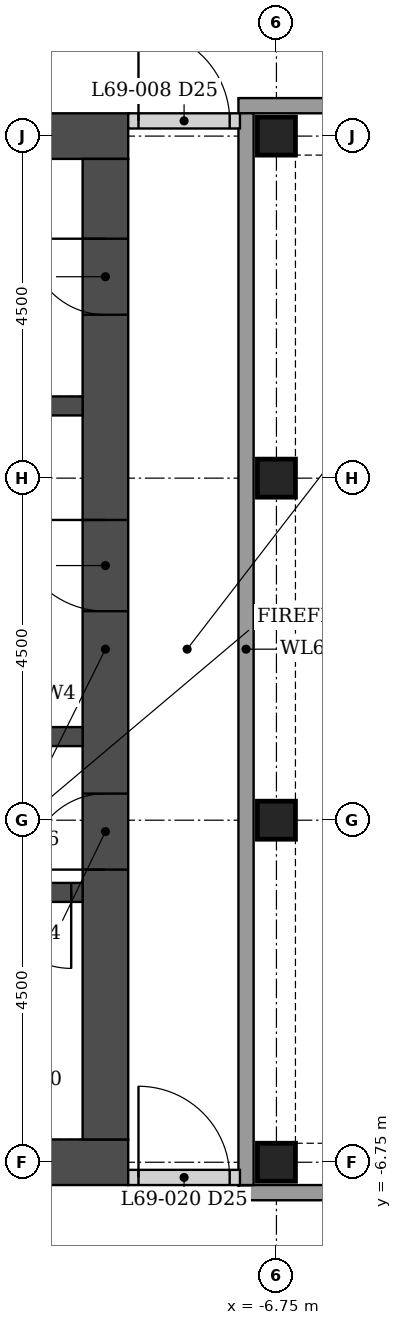
"""IFC4 building model, lengths in metres.
Left out: names, types, materials, properties, quantities, classifications, styles, units other than length and angle.
Written with IfcOpenShell. Run it as: python <this file> out.ifc"""

import sys

from ifc_helpers import new_model, si_unit, direction, frame, frame_2d, origin, origin_2d, place, context, subcontext, project, spatial, rectangle, hollow_rectangle, extrude, element, fill, save


model = new_model("IFC4")
c1 = context("Model", 3, precision=1e-05, world=origin(), true_north=direction((0.0, 1.0)))
c2 = subcontext(c1, "Body", "Model", "MODEL_VIEW")
j1 = project(units=[si_unit("LENGTHUNIT", "METRE"), si_unit("PLANEANGLEUNIT", "RADIAN")], contexts=[c1])
p1 = place(None, origin())
s1 = spatial("IfcSite", under=j1, at=p1, CompositionType="ELEMENT")
p2 = place(p1, origin())
s2 = spatial("IfcBuilding", under=s1, at=p2, CompositionType="ELEMENT")
p3 = place(p2, frame((0.0, 0.0, 268.05)))
s3 = spatial("IfcBuildingStorey", under=s2, at=p3, CompositionType="ELEMENT", Elevation=268.05)
for number, where, z_axis, x_axis in (
    (1, (-6.75, -6.75, 0.0), (0.0, 0.0, 1.0), (1.0, 0.0, 0.0)),
    (2, (-6.75, -2.25, 0.0), (0.0, 0.0, 1.0), (1.0, 0.0, 0.0)),
    (3, (-6.75, 2.25, 0.0), (0.0, 0.0, 1.0), (1.0, 0.0, 0.0)),
    (4, (-6.75, 6.75, 0.0), (0.0, 0.0, 1.0), (1.0, 0.0, 0.0)),
):
    element("IfcColumn", number, at=place(p3, frame(where, z_axis=z_axis, x_axis=x_axis)), inside=s3, PredefinedType="COLUMN", context=c2, shape_type="SweptSolid", body=[
        extrude(hollow_rectangle(XDim=0.5, YDim=0.5, WallThickness=0.025, at=origin_2d()), origin(), (0.0, 0.0, 1.0), 6.0),
    ])
for number, where, z_axis, x_axis in (
    (5, (-8.7, -6.75, 0.0), (0.0, 0.0, 1.0), (-1.0, 0.0, 0.0)),
    (6, (-8.7, 6.75, 0.0), (0.0, 0.0, 1.0), (-1.0, 0.0, 0.0)),
):
    element("IfcWall", number, at=place(p3, frame(where, z_axis=z_axis, x_axis=x_axis)), inside=s3, PredefinedType="SHEAR", context=c2, shape_type="SweptSolid", body=[
        extrude(rectangle(XDim=9.6, YDim=0.6, at=frame_2d((4.8, 0.0))), origin(), (0.0, 0.0, 1.0), 6.0),
    ])
p4 = place(p3, frame((-9.0, -6.45, 0.0), z_axis=(0.0, 0.0, 1.0), x_axis=(0.0, 1.0, 0.0)))
e7 = element("IfcWall", 7, at=p4, inside=s3, PredefinedType="SHEAR", context=c2, shape_type="SweptSolid", body=[
    extrude(rectangle(XDim=12.9, YDim=0.6, at=frame_2d((6.45, 0.0))), origin(), (0.0, 0.0, 1.0), 6.0),
])
p5 = place(p4, frame((3.55, 0.0, 0.0)))
e8 = element("IfcOpeningElement", 8, at=p5, cuts=e7, PredefinedType="OPENING", context=c2, shape_type="SweptSolid", body=[
    extrude(rectangle(XDim=1.0, YDim=2.1, at=frame_2d((0.5, 1.05))), frame((0.0, 0.31, 0.0), z_axis=(0.0, -1.0, 0.0), x_axis=(1.0, 0.0, 0.0)), (0.0, 0.0, 1.0), 0.62),
])
p6 = place(p4, frame((6.95, 0.0, 0.0)))
e9 = element("IfcOpeningElement", 9, at=p6, cuts=e7, PredefinedType="OPENING", context=c2, shape_type="SweptSolid", body=[
    extrude(rectangle(XDim=1.2, YDim=2.1, at=frame_2d((0.6, 1.05))), frame((0.0, 0.31, 0.0), z_axis=(0.0, -1.0, 0.0), x_axis=(1.0, 0.0, 0.0)), (0.0, 0.0, 1.0), 0.62),
])
p7 = place(p4, frame((10.85, 0.0, 0.0)))
e10 = element("IfcOpeningElement", 10, at=p7, cuts=e7, PredefinedType="OPENING", context=c2, shape_type="SweptSolid", body=[
    extrude(rectangle(XDim=1.0, YDim=2.1, at=frame_2d((0.5, 1.05))), frame((0.0, 0.31, 0.0), z_axis=(0.0, -1.0, 0.0), x_axis=(1.0, 0.0, 0.0)), (0.0, 0.0, 1.0), 0.62),
])
p8 = place(p3, frame((-9.3, -3.2, 0.0), z_axis=(0.0, 0.0, 1.0), x_axis=(-1.0, 0.0, 0.0)))
e11 = element("IfcWall", 11, at=p8, inside=s3, PredefinedType="SHEAR", context=c2, shape_type="SweptSolid", body=[
    extrude(rectangle(XDim=8.4, YDim=0.25, at=frame_2d((4.2, 0.0))), origin(), (0.0, 0.0, 1.0), 6.0),
])
p9 = place(p8, frame((0.15, 0.0, 0.0)))
e12 = element("IfcOpeningElement", 12, at=p9, cuts=e11, PredefinedType="OPENING", context=c2, shape_type="SweptSolid", body=[
    extrude(rectangle(XDim=1.0, YDim=2.1, at=frame_2d((0.5, 1.05))), frame((0.0, 0.135, 0.0), z_axis=(0.0, -1.0, 0.0), x_axis=(1.0, 0.0, 0.0)), (0.0, 0.0, 1.0), 0.27),
])
p10 = place(p3, frame((-9.3, 3.2, 0.0), z_axis=(0.0, 0.0, 1.0), x_axis=(-1.0, 0.0, 0.0)))
e13 = element("IfcWall", 13, at=p10, inside=s3, PredefinedType="SHEAR", context=c2, shape_type="SweptSolid", body=[
    extrude(rectangle(XDim=8.4, YDim=0.25, at=frame_2d((4.2, 0.0))), origin(), (0.0, 0.0, 1.0), 6.0),
])
p11 = place(p3, frame((-9.3, -1.15, 0.0), z_axis=(0.0, 0.0, 1.0), x_axis=(-1.0, 0.0, 0.0)))
e14 = element("IfcWall", 14, at=p11, inside=s3, PredefinedType="SHEAR", context=c2, shape_type="SweptSolid", body=[
    extrude(rectangle(XDim=5.375, YDim=0.25, at=frame_2d((2.688, 0.0))), origin(), (0.0, 0.0, 1.0), 6.0),
])
for number, where, z_axis, x_axis in (
    (15, (-7.25, 7.15, 0.0), (0.0, 0.0, 1.0), (1.0, 0.0, 0.0)),
    (16, (-7.25, -7.15, 0.0), (0.0, 0.0, 1.0), (1.0, 0.0, 0.0)),
):
    element("IfcWall", number, at=place(p3, frame(where, z_axis=z_axis, x_axis=x_axis)), inside=s3, PredefinedType="SOLIDWALL", context=c2, shape_type="SweptSolid", body=[
        extrude(rectangle(XDim=14.5, YDim=0.2, at=frame_2d((7.25, 0.0))), origin(), (0.0, 0.0, 1.0), 4.829),
    ])
p12 = place(p3, frame((-7.15, -7.05, 0.0), z_axis=(0.0, 0.0, 1.0), x_axis=(0.0, 1.0, 0.0)))
e17 = element("IfcWall", 17, at=p12, inside=s3, PredefinedType="SOLIDWALL", context=c2, shape_type="SweptSolid", body=[
    extrude(rectangle(XDim=14.1, YDim=0.2, at=frame_2d((7.05, 0.0))), origin(), (0.0, 0.0, 1.0), 4.829),
])
p13 = place(p3, frame((-8.7, 6.95, 0.0), z_axis=(0.0, 0.0, 1.0), x_axis=(1.0, 0.0, 0.0)))
e18 = element("IfcWall", 18, at=p13, inside=s3, PredefinedType="PARTITIONING", context=c2, shape_type="SweptSolid", body=[
    extrude(rectangle(XDim=1.47, YDim=0.2, at=frame_2d((0.735, 0.0))), origin(), (0.0, 0.0, 1.0), 4.829),
])
p14 = place(p13, frame((0.135, 0.0, 0.0)))
e19 = element("IfcOpeningElement", 19, at=p14, cuts=e18, PredefinedType="OPENING", context=c2, shape_type="SweptSolid", body=[
    extrude(rectangle(XDim=1.2, YDim=2.1, at=frame_2d((0.6, 1.05))), frame((0.0, 0.11, 0.0), z_axis=(0.0, -1.0, 0.0), x_axis=(1.0, 0.0, 0.0)), (0.0, 0.0, 1.0), 0.22),
])
p15 = place(p3, frame((-8.7, -6.95, 0.0), z_axis=(0.0, 0.0, 1.0), x_axis=(1.0, 0.0, 0.0)))
e20 = element("IfcWall", 20, at=p15, inside=s3, PredefinedType="PARTITIONING", context=c2, shape_type="SweptSolid", body=[
    extrude(rectangle(XDim=1.47, YDim=0.2, at=frame_2d((0.735, 0.0))), origin(), (0.0, 0.0, 1.0), 4.829),
])
p16 = place(p15, frame((0.135, 0.0, 0.0)))
e21 = element("IfcOpeningElement", 21, at=p16, cuts=e20, PredefinedType="OPENING", context=c2, shape_type="SweptSolid", body=[
    extrude(rectangle(XDim=1.2, YDim=2.1, at=frame_2d((0.6, 1.05))), frame((0.0, 0.11, 0.0), z_axis=(0.0, -1.0, 0.0), x_axis=(1.0, 0.0, 0.0)), (0.0, 0.0, 1.0), 0.22),
])
p17 = place(p14, origin())
e22 = element("IfcDoor", 22, at=p17, inside=s3, OperationType="DOUBLE_DOOR_DOUBLE_SWING", PredefinedType="DOOR", context=c2, shape_type="SweptSolid", body=[
    extrude(rectangle(XDim=1.2, YDim=2.1, at=frame_2d((0.6, 1.05))), frame((0.0, 0.025, 0.0), z_axis=(0.0, -1.0, 0.0), x_axis=(1.0, 0.0, 0.0)), (0.0, 0.0, 1.0), 0.05),
])
fill(e19, e22)
p18 = place(p16, origin())
e23 = element("IfcDoor", 23, at=p18, inside=s3, OperationType="DOUBLE_DOOR_DOUBLE_SWING", PredefinedType="DOOR", context=c2, shape_type="SweptSolid", body=[
    extrude(rectangle(XDim=1.2, YDim=2.1, at=frame_2d((0.6, 1.05))), frame((0.0, 0.025, 0.0), z_axis=(0.0, -1.0, 0.0), x_axis=(1.0, 0.0, 0.0)), (0.0, 0.0, 1.0), 0.05),
])
fill(e21, e23)
p19 = place(p5, origin())
e24 = element("IfcDoor", 24, at=p19, inside=s3, OperationType="SINGLE_SWING_LEFT", PredefinedType="DOOR", context=c2, shape_type="SweptSolid", body=[
    extrude(rectangle(XDim=1.0, YDim=2.1, at=frame_2d((0.5, 1.05))), frame((0.0, 0.025, 0.0), z_axis=(0.0, -1.0, 0.0), x_axis=(1.0, 0.0, 0.0)), (0.0, 0.0, 1.0), 0.05),
])
fill(e8, e24)
p20 = place(p9, origin())
e25 = element("IfcDoor", 25, at=p20, inside=s3, OperationType="SINGLE_SWING_LEFT", PredefinedType="DOOR", context=c2, shape_type="SweptSolid", body=[
    extrude(rectangle(XDim=1.0, YDim=2.1, at=frame_2d((0.5, 1.05))), frame((0.0, 0.025, 0.0), z_axis=(0.0, -1.0, 0.0), x_axis=(1.0, 0.0, 0.0)), (0.0, 0.0, 1.0), 0.05),
])
fill(e12, e25)
p21 = place(p6, origin())
e26 = element("IfcDoor", 26, at=p21, inside=s3, OperationType="SINGLE_SWING_RIGHT", PredefinedType="DOOR", context=c2, shape_type="SweptSolid", body=[
    extrude(rectangle(XDim=1.2, YDim=2.1, at=frame_2d((0.6, 1.05))), frame((0.0, 0.025, 0.0), z_axis=(0.0, -1.0, 0.0), x_axis=(1.0, 0.0, 0.0)), (0.0, 0.0, 1.0), 0.05),
])
fill(e9, e26)
p22 = place(p7, origin())
e27 = element("IfcDoor", 27, at=p22, inside=s3, OperationType="SINGLE_SWING_RIGHT", PredefinedType="DOOR", context=c2, shape_type="SweptSolid", body=[
    extrude(rectangle(XDim=1.0, YDim=2.1, at=frame_2d((0.5, 1.05))), frame((0.0, 0.025, 0.0), z_axis=(0.0, -1.0, 0.0), x_axis=(1.0, 0.0, 0.0)), (0.0, 0.0, 1.0), 0.05),
])
fill(e10, e27)
save(model, sys.argv[1])
